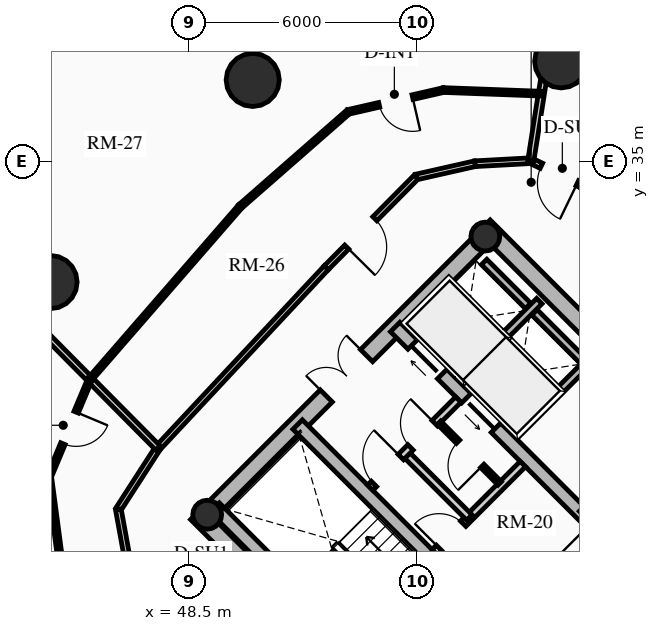
"""IFC4 building model, lengths in metres.
Left out: names, types, materials, properties, quantities, classifications, styles, units other than length and angle.
Written with IfcOpenShell. Run it as: python <this file> out.ifc"""

import sys

from ifc_helpers import new_model, si_unit, direction, frame, frame_2d, origin, origin_2d, place, context, subcontext, project, spatial, rectangle, circle, hollow_circle, extrude, source, transform, mapped, element, fill, save


model = new_model("IFC4")
c1 = context("Model", 3, precision=1e-05, world=origin(), true_north=direction((0.0, 1.0)))
c2 = subcontext(c1, "Body", "Model", "MODEL_VIEW")
j1 = project(units=[si_unit("LENGTHUNIT", "METRE"), si_unit("PLANEANGLEUNIT", "RADIAN")], contexts=[c1])
p1 = place(None, origin())
s1 = spatial("IfcSite", under=j1, at=p1, CompositionType="ELEMENT")
p2 = place(p1, origin())
s2 = spatial("IfcBuilding", under=s1, at=p2, CompositionType="ELEMENT")
p3 = place(p2, frame((0.0, 0.0, 87.61)))
s3 = spatial("IfcBuildingStorey", under=s2, at=p3, CompositionType="ELEMENT", Elevation=87.61)
for number, where, z_axis, x_axis in (
    (1, (58.737, 15.697, 0.0), (0.0, 0.0, 1.0), (-0.707, 0.707, 0.0)),
    (2, (66.303, 23.263, 0.0), (0.0, 0.0, 1.0), (-0.707, 0.707, 0.0)),
):
    element("IfcWall", number, at=place(p3, frame(where, z_axis=z_axis, x_axis=x_axis)), inside=s3, PredefinedType="SHEAR", context=c2, shape_type="SweptSolid", body=[
        extrude(rectangle(XDim=14.2, YDim=0.45, at=frame_2d((7.1, 0.0))), origin(), (0.0, 0.0, 1.0), 2.91),
    ])
p4 = place(p3, frame((48.856, 25.578, 0.0), z_axis=(0.0, 0.0, 1.0), x_axis=(0.707106781187, 0.707106781187, 0.0)))
e3 = element("IfcWall", 3, at=p4, inside=s3, PredefinedType="SHEAR", context=c2, shape_type="SweptSolid", body=[
    extrude(rectangle(XDim=10.7, YDim=0.45, at=frame_2d((5.35, 0.0))), origin(), (0.0, 0.0, 1.0), 2.91),
])
m1 = source(origin(), c2, "Body", "SweptSolid", [
    extrude(rectangle(XDim=1.5, YDim=2.02, at=frame_2d((0.75, 1.01))), frame((0.0, 0.235, 0.0), z_axis=(0.0, -1.0, 0.0), x_axis=(1.0, 0.0, 0.0)), (0.0, 0.0, 1.0), 0.47),
])
p5 = place(p4, frame((4.6, 0.0, 0.0)))
e4 = element("IfcOpeningElement", 4, at=p5, cuts=e3, PredefinedType="OPENING", context=c2, shape_type="MappedRepresentation", body=[
    mapped(m1, transform((0.0, 0.0, 0.0), x_axis=(1.0, 0.0, 0.0), y_axis=(0.0, 1.0, 0.0), z_axis=(0.0, 0.0, 1.0), scale=1.0)),
])
p6 = place(p3, frame((61.078, 18.355, 0.0), z_axis=(0.0, 0.0, 1.0), x_axis=(-0.707106781187, 0.707106781187, 0.0)))
e5 = element("IfcWall", 5, at=p6, inside=s3, PredefinedType="SHEAR", context=c2, shape_type="SweptSolid", body=[
    extrude(rectangle(XDim=13.75, YDim=0.35, at=frame_2d((6.875, 0.0))), origin(), (0.0, 0.0, 1.0), 2.91),
])
m2 = source(origin(), c2, "Body", "SweptSolid", [
    extrude(rectangle(XDim=1.1, YDim=2.015, at=frame_2d((0.55, 1.007))), frame((0.0, 0.185, 0.0), z_axis=(0.0, -1.0, 0.0), x_axis=(1.0, 0.0, 0.0)), (0.0, 0.0, 1.0), 0.37),
])
p7 = place(p6, frame((4.875, 0.0, 0.0)))
e6 = element("IfcOpeningElement", 6, at=p7, cuts=e5, PredefinedType="OPENING", context=c2, shape_type="MappedRepresentation", body=[
    mapped(m2, transform((0.0, 0.0, 0.0), x_axis=(1.0, 0.0, 0.0), y_axis=(0.0, 1.0, 0.0), z_axis=(0.0, 0.0, 1.0), scale=1.0)),
])
m3 = source(origin(), c2, "Body", "SweptSolid", [
    extrude(rectangle(XDim=1.15, YDim=2.02, at=frame_2d((0.575, 1.01))), frame((0.0, 0.185, 0.0), z_axis=(0.0, -1.0, 0.0), x_axis=(1.0, 0.0, 0.0)), (0.0, 0.0, 1.0), 0.37),
])
p8 = place(p6, frame((7.295, 0.0, 0.0)))
e7 = element("IfcOpeningElement", 7, at=p8, cuts=e5, PredefinedType="OPENING", context=c2, shape_type="MappedRepresentation", body=[
    mapped(m3, transform((0.0, 0.0, 0.0), x_axis=(1.0, 0.0, 0.0), y_axis=(0.0, 1.0, 0.0), z_axis=(0.0, 0.0, 1.0), scale=1.0)),
])
p9 = place(p3, frame((63.645, 20.922, 0.0), z_axis=(0.0, 0.0, 1.0), x_axis=(-0.707106781187, 0.707106781187, 0.0)))
e8 = element("IfcWall", 8, at=p9, inside=s3, PredefinedType="SHEAR", context=c2, shape_type="SweptSolid", body=[
    extrude(rectangle(XDim=13.75, YDim=0.35, at=frame_2d((6.875, 0.0))), origin(), (0.0, 0.0, 1.0), 2.91),
])
p10 = place(p9, frame((10.0, 0.0, 0.0)))
e9 = element("IfcOpeningElement", 9, at=p10, cuts=e8, PredefinedType="OPENING", context=c2, shape_type="MappedRepresentation", body=[
    mapped(m2, transform((0.0, 0.0, 0.0), x_axis=(1.0, 0.0, 0.0), y_axis=(0.0, 1.0, 0.0), z_axis=(0.0, 0.0, 1.0), scale=1.0)),
])
p11 = place(p9, frame((12.0, 0.0, 0.0)))
e10 = element("IfcOpeningElement", 10, at=p11, cuts=e8, PredefinedType="OPENING", context=c2, shape_type="MappedRepresentation", body=[
    mapped(m2, transform((0.0, 0.0, 0.0), x_axis=(1.0, 0.0, 0.0), y_axis=(0.0, 1.0, 0.0), z_axis=(0.0, 0.0, 1.0), scale=1.0)),
])
p12 = place(p9, frame((5.305, 0.0, 0.0)))
e11 = element("IfcOpeningElement", 11, at=p12, cuts=e8, PredefinedType="OPENING", context=c2, shape_type="MappedRepresentation", body=[
    mapped(m3, transform((0.0, 0.0, 0.0), x_axis=(1.0, 0.0, 0.0), y_axis=(0.0, 1.0, 0.0), z_axis=(0.0, 0.0, 1.0), scale=1.0)),
])
p13 = place(p3, frame((53.922, 21.141, 0.0), z_axis=(0.0, 0.0, 1.0), x_axis=(-0.707088616009, 0.707124945897, 0.0)))
e12 = element("IfcWall", 12, at=p13, inside=s3, PredefinedType="SHEAR", context=c2, shape_type="SweptSolid", body=[
    extrude(rectangle(XDim=6.72, YDim=0.35, at=frame_2d((3.36, 0.0))), origin(), (0.0, 0.0, 1.0), 2.91),
])
for number, where, z_axis, x_axis in (
    (13, (48.976, 25.706, 0.0), (0.0, 0.0, 1.0), (0.707, 0.707, 0.0)),
    (14, (56.294, 33.024, 0.0), (0.0, 0.0, 1.0), (0.707, 0.707, 0.0)),
):
    element("IfcColumn", number, at=place(p3, frame(where, z_axis=z_axis, x_axis=x_axis)), inside=s3, PredefinedType="COLUMN", context=c2, shape_type="SweptSolid", body=[
        extrude(hollow_circle(Radius=0.38, WallThickness=0.032, at=origin_2d()), origin(), (0.0, 0.0, 1.0), 2.91),
    ])
for number, where, z_axis, x_axis in (
    (15, (58.291, 37.635, 0.0), (0.0, 0.0, 1.0), (1.0, 0.0, 0.0)),
    (16, (50.173, 37.146, 0.0), (0.0, 0.0, 1.0), (1.0, 0.0, 0.0)),
    (17, (44.854, 31.827, 0.0), (0.0, 0.0, 1.0), (1.0, 0.0, 0.0)),
):
    element("IfcColumn", number, at=place(p3, frame(where, z_axis=z_axis, x_axis=x_axis)), inside=s3, PredefinedType="USERDEFINED", context=c2, shape_type="SweptSolid", body=[
        extrude(circle(Radius=0.7, at=origin_2d()), origin(), (0.0, 0.0, 1.0), 2.91),
    ])
p14 = place(p3, frame((57.062, 27.781, 0.0), z_axis=(0.0, 0.0, 1.0), x_axis=(0.707106781187, 0.707106781187, 0.0)))
e18 = element("IfcWall", 18, at=p14, inside=s3, PredefinedType="SHEAR", context=c2, shape_type="SweptSolid", body=[
    extrude(rectangle(XDim=2.97, YDim=0.2, at=frame_2d((1.485, 0.0))), origin(), (0.0, 0.0, 1.0), 2.91),
])
p15 = place(p3, frame((55.615, 29.227, 0.0), z_axis=(0.0, 0.0, 1.0), x_axis=(0.707147878904, 0.70706568108, 0.0)))
e19 = element("IfcWall", 19, at=p15, inside=s3, PredefinedType="SHEAR", context=c2, shape_type="SweptSolid", body=[
    extrude(rectangle(XDim=2.97, YDim=0.2, at=frame_2d((1.485, 0.0))), origin(), (0.0, 0.0, 1.0), 2.91),
])
p16 = place(p3, frame((58.865, 29.754, 0.0), z_axis=(0.0, 0.0, 1.0), x_axis=(-0.707174411312, 0.707039144592, 0.0)))
e20 = element("IfcWall", 20, at=p16, inside=s3, PredefinedType="SHEAR", context=c2, shape_type="SweptSolid", body=[
    extrude(rectangle(XDim=1.805, YDim=0.2, at=frame_2d((0.902, 0.0))), origin(), (0.0, 0.0, 1.0), 2.91),
])
p17 = place(p3, frame((57.419, 31.2, 0.0), z_axis=(0.0, 0.0, 1.0), x_axis=(-0.707032117043, 0.707181437447, 0.0)))
e21 = element("IfcWall", 21, at=p17, inside=s3, PredefinedType="SHEAR", context=c2, shape_type="SweptSolid", body=[
    extrude(rectangle(XDim=1.635, YDim=0.2, at=frame_2d((0.817, 0.0))), origin(), (0.0, 0.0, 1.0), 2.91),
])
p18 = place(p3, frame((54.961, 24.719, 0.0), z_axis=(0.0, 0.0, 1.0), x_axis=(0.707106781187, 0.707106781187, 0.0)))
e22 = element("IfcWall", 22, at=p18, inside=s3, PredefinedType="PARTITIONING", context=c2, shape_type="SweptSolid", body=[
    extrude(rectangle(XDim=3.28, YDim=0.2, at=frame_2d((1.64, 0.0))), origin(), (0.0, 0.0, 1.0), 2.655),
])
m4 = source(origin(), c2, "Body", "SweptSolid", [
    extrude(rectangle(XDim=0.9, YDim=2.005, at=frame_2d((0.45, 1.002))), frame((0.0, 0.11, 0.0), z_axis=(0.0, -1.0, 0.0), x_axis=(1.0, 0.0, 0.0)), (0.0, 0.0, 1.0), 0.22),
])
p19 = place(p18, frame((0.16, 0.0, 0.0)))
e23 = element("IfcOpeningElement", 23, at=p19, cuts=e22, PredefinedType="OPENING", context=c2, shape_type="MappedRepresentation", body=[
    mapped(m4, transform((0.0, 0.0, 0.0), x_axis=(1.0, 0.0, 0.0), y_axis=(0.0, 1.0, 0.0), z_axis=(0.0, 0.0, 1.0), scale=1.0)),
])
p20 = place(p3, frame((55.874, 25.631, 0.0), z_axis=(0.0, 0.0, 1.0), x_axis=(-0.707157639372, 0.707055919343, 0.0)))
e24 = element("IfcWall", 24, at=p20, inside=s3, PredefinedType="PARTITIONING", context=c2, shape_type="SweptSolid", body=[
    extrude(rectangle(XDim=2.4, YDim=0.2, at=frame_2d((1.2, 0.0))), origin(), (0.0, 0.0, 1.0), 2.655),
])
p21 = place(p3, frame((53.264, 26.416, 0.0), z_axis=(0.0, 0.0, 1.0), x_axis=(0.707106781187, 0.707106781187, 0.0)))
e25 = element("IfcWall", 25, at=p21, inside=s3, PredefinedType="PARTITIONING", context=c2, shape_type="SweptSolid", body=[
    extrude(rectangle(XDim=3.28, YDim=0.2, at=frame_2d((1.64, 0.0))), origin(), (0.0, 0.0, 1.0), 2.655),
])
m5 = source(origin(), c2, "Body", "SweptSolid", [
    extrude(rectangle(XDim=1.0, YDim=2.015, at=frame_2d((0.5, 1.007))), frame((0.0, 0.11, 0.0), z_axis=(0.0, -1.0, 0.0), x_axis=(1.0, 0.0, 0.0)), (0.0, 0.0, 1.0), 0.22),
])
p22 = place(p21, frame((0.14, 0.0, 0.0)))
e26 = element("IfcOpeningElement", 26, at=p22, cuts=e25, PredefinedType="OPENING", context=c2, shape_type="MappedRepresentation", body=[
    mapped(m5, transform((0.0, 0.0, 0.0), x_axis=(1.0, 0.0, 0.0), y_axis=(0.0, 1.0, 0.0), z_axis=(0.0, 0.0, 1.0), scale=1.0)),
])
p23 = place(p21, frame((1.5, 0.0, 0.0)))
e27 = element("IfcOpeningElement", 27, at=p23, cuts=e25, PredefinedType="OPENING", context=c2, shape_type="MappedRepresentation", body=[
    mapped(m4, transform((0.0, 0.0, 0.0), x_axis=(1.0, 0.0, 0.0), y_axis=(0.0, 1.0, 0.0), z_axis=(0.0, 0.0, 1.0), scale=1.0)),
])
p24 = place(p3, frame((56.673, 26.529, 0.0), z_axis=(0.0, 0.0, 1.0), x_axis=(-0.707052764397, 0.70716079385, 0.0)))
e28 = element("IfcWall", 28, at=p24, inside=s3, PredefinedType="PARTITIONING", context=c2, shape_type="SweptSolid", body=[
    extrude(rectangle(XDim=2.26, YDim=0.125, at=frame_2d((1.13, 0.0))), origin(), (0.0, 0.0, 1.0), 2.655),
])
m6 = source(origin(), c2, "Body", "SweptSolid", [
    extrude(rectangle(XDim=0.9, YDim=2.005, at=frame_2d((0.45, 1.002))), frame((0.0, 0.073, 0.0), z_axis=(0.0, -1.0, 0.0), x_axis=(1.0, 0.0, 0.0)), (0.0, 0.0, 1.0), 0.145),
])
p25 = place(p24, frame((0.65, 0.0, 0.0)))
e29 = element("IfcOpeningElement", 29, at=p25, cuts=e28, PredefinedType="OPENING", context=c2, shape_type="MappedRepresentation", body=[
    mapped(m6, transform((0.0, 0.0, 0.0), x_axis=(1.0, 0.0, 0.0), y_axis=(0.0, 1.0, 0.0), z_axis=(0.0, 0.0, 1.0), scale=1.0)),
])
p26 = place(p3, frame((58.823, 34.378, 0.0), z_axis=(0.0, 0.0, 1.0), x_axis=(-0.900449137666, 0.434961320668, 0.0)))
e30 = element("IfcWall", 30, at=p26, inside=s3, PredefinedType="PARTITIONING", context=c2, shape_type="SweptSolid", body=[
    extrude(rectangle(XDim=1.479, YDim=0.15, at=frame_2d((0.74, 0.0))), origin(), (0.0, 0.0, 1.0), 2.225),
])
m7 = source(origin(), c2, "Body", "SweptSolid", [
    extrude(rectangle(XDim=1.05, YDim=2.015, at=frame_2d((0.525, 1.007))), frame((0.0, 0.085, 0.0), z_axis=(0.0, -1.0, 0.0), x_axis=(1.0, 0.0, 0.0)), (0.0, 0.0, 1.0), 0.17),
])
p27 = place(p26, frame((0.12, 0.0, 0.0)))
e31 = element("IfcOpeningElement", 31, at=p27, cuts=e30, PredefinedType="OPENING", context=c2, shape_type="MappedRepresentation", body=[
    mapped(m7, transform((0.0, 0.0, 0.0), x_axis=(1.0, 0.0, 0.0), y_axis=(0.0, 1.0, 0.0), z_axis=(0.0, 0.0, 1.0), scale=1.0)),
])
p28 = place(p3, frame((57.491, 35.021, 0.0), z_axis=(0.0, 0.0, 1.0), x_axis=(-0.9985194771, -0.054395347698, 0.0)))
e32 = element("IfcWall", 32, at=p28, inside=s3, PredefinedType="PARTITIONING", context=c2, shape_type="SweptSolid", body=[
    extrude(rectangle(XDim=1.472, YDim=0.15, at=frame_2d((0.736, 0.0))), origin(), (0.0, 0.0, 1.0), 2.225),
])
p29 = place(p3, frame((56.021, 34.941, 0.0), z_axis=(0.0, 0.0, 1.0), x_axis=(-0.975309543901, -0.220842236847, 0.0)))
e33 = element("IfcWall", 33, at=p29, inside=s3, PredefinedType="PARTITIONING", context=c2, shape_type="SweptSolid", body=[
    extrude(rectangle(XDim=1.585, YDim=0.15, at=frame_2d((0.792, 0.0))), origin(), (0.0, 0.0, 1.0), 2.225),
])
p30 = place(p3, frame((54.475, 34.591, 0.0), z_axis=(0.0, 0.0, 1.0), x_axis=(-0.703869646439, -0.710329163714, 0.0)))
e34 = element("IfcWall", 34, at=p30, inside=s3, PredefinedType="PARTITIONING", context=c2, shape_type="SweptSolid", body=[
    extrude(rectangle(XDim=3.364, YDim=0.15, at=frame_2d((1.682, 0.0))), origin(), (0.0, 0.0, 1.0), 2.225),
])
p31 = place(p30, frame((1.546, 0.0, 0.0)))
e35 = element("IfcOpeningElement", 35, at=p31, cuts=e34, PredefinedType="OPENING", context=c2, shape_type="MappedRepresentation", body=[
    mapped(m7, transform((0.0, 0.0, 0.0), x_axis=(1.0, 0.0, 0.0), y_axis=(0.0, 1.0, 0.0), z_axis=(0.0, 0.0, 1.0), scale=1.0)),
])
p32 = place(p3, frame((52.107, 32.202, 0.0), z_axis=(0.0, 0.0, 1.0), x_axis=(-0.682605209028, -0.730787334734, 0.0)))
e36 = element("IfcWall", 36, at=p32, inside=s3, PredefinedType="PARTITIONING", context=c2, shape_type="SweptSolid", body=[
    extrude(rectangle(XDim=6.486, YDim=0.15, at=frame_2d((3.243, 0.0))), origin(), (0.0, 0.0, 1.0), 2.225),
])
p33 = place(p3, frame((47.68, 27.462, 0.0), z_axis=(0.0, 0.0, 1.0), x_axis=(-0.542097952486, -0.840315303865, 0.0)))
e37 = element("IfcWall", 37, at=p33, inside=s3, PredefinedType="PARTITIONING", context=c2, shape_type="SweptSolid", body=[
    extrude(rectangle(XDim=1.923, YDim=0.15, at=frame_2d((0.961, 0.0))), origin(), (0.0, 0.0, 1.0), 2.225),
])
p34 = place(p3, frame((46.637, 25.846, 0.0), z_axis=(0.0, 0.0, 1.0), x_axis=(0.179617307107, -0.983736561782, 0.0)))
e38 = element("IfcWall", 38, at=p34, inside=s3, PredefinedType="PARTITIONING", context=c2, shape_type="SweptSolid", body=[
    extrude(rectangle(XDim=1.38, YDim=0.15, at=frame_2d((0.69, 0.0))), origin(), (0.0, 0.0, 1.0), 2.225),
])
p35 = place(p3, frame((57.491, 35.021, 0.0), z_axis=(0.0, 0.0, 1.0), x_axis=(0.155805268746, 0.98778779008, 0.0)))
e39 = element("IfcWall", 39, at=p35, inside=s3, PredefinedType="PARTITIONING", context=c2, shape_type="SweptSolid", body=[
    extrude(rectangle(XDim=6.376, YDim=0.16, at=frame_2d((3.188, 0.0))), origin(), (0.0, 0.0, 1.0), 2.179),
])
p36 = place(p3, frame((47.68, 27.462, 0.0), z_axis=(0.0, 0.0, 1.0), x_axis=(-0.703913074907, 0.710286127539, 0.0)))
e40 = element("IfcWall", 40, at=p36, inside=s3, PredefinedType="PARTITIONING", context=c2, shape_type="SweptSolid", body=[
    extrude(rectangle(XDim=9.079, YDim=0.16, at=frame_2d((4.54, 0.0))), origin(), (0.0, 0.0, 1.0), 2.179),
])
p37 = place(p3, frame((57.769, 36.785, 0.0), z_axis=(0.0, 0.0, 1.0), x_axis=(-0.999316779648, 0.036959084311, 0.0)))
e41 = element("IfcWall", 41, at=p37, inside=s3, PredefinedType="PARTITIONING", context=c2, shape_type="SweptSolid", body=[
    extrude(rectangle(XDim=2.576, YDim=0.125, at=frame_2d((1.288, 0.0))), origin(), (0.0, 0.0, 1.0), 2.655),
])
p38 = place(p3, frame((55.194, 36.88, 0.0), z_axis=(0.0, 0.0, 1.0), x_axis=(-0.97469098149, -0.22355645954, 0.0)))
e42 = element("IfcWall", 42, at=p38, inside=s3, PredefinedType="PARTITIONING", context=c2, shape_type="SweptSolid", body=[
    extrude(rectangle(XDim=2.573, YDim=0.125, at=frame_2d((1.287, 0.0))), origin(), (0.0, 0.0, 1.0), 2.225),
])
p39 = place(p38, frame((0.836, 0.0, 0.0)))
e43 = element("IfcOpeningElement", 43, at=p39, cuts=e42, PredefinedType="OPENING", context=c2, shape_type="MappedRepresentation", body=[
    mapped(m6, transform((0.0, 0.0, 0.0), x_axis=(1.0, 0.0, 0.0), y_axis=(0.0, 1.0, 0.0), z_axis=(0.0, 0.0, 1.0), scale=1.0)),
])
p40 = place(p3, frame((52.687, 36.305, 0.0), z_axis=(0.0, 0.0, 1.0), x_axis=(-0.752332345919, -0.658783759123, 0.0)))
e44 = element("IfcWall", 44, at=p40, inside=s3, PredefinedType="PARTITIONING", context=c2, shape_type="SweptSolid", body=[
    extrude(rectangle(XDim=3.776, YDim=0.125, at=frame_2d((1.888, 0.0))), origin(), (0.0, 0.0, 1.0), 2.225),
])
p41 = place(p3, frame((49.845, 33.817, 0.0), z_axis=(0.0, 0.0, 1.0), x_axis=(-0.656101508867, -0.754672650931, 0.0)))
e45 = element("IfcWall", 45, at=p41, inside=s3, PredefinedType="PARTITIONING", context=c2, shape_type="SweptSolid", body=[
    extrude(rectangle(XDim=6.029, YDim=0.125, at=frame_2d((3.014, 0.0))), origin(), (0.0, 0.0, 1.0), 2.225),
])
p42 = place(p3, frame((45.89, 29.268, 0.0), z_axis=(0.0, 0.0, 1.0), x_axis=(-0.387057419757, -0.922055613188, 0.0)))
e46 = element("IfcWall", 46, at=p42, inside=s3, PredefinedType="PARTITIONING", context=c2, shape_type="SweptSolid", body=[
    extrude(rectangle(XDim=2.774, YDim=0.125, at=frame_2d((1.387, 0.0))), origin(), (0.0, 0.0, 1.0), 2.225),
])
p43 = place(p42, frame((0.937, 0.0, 0.0)))
e47 = element("IfcOpeningElement", 47, at=p43, cuts=e46, PredefinedType="OPENING", context=c2, shape_type="MappedRepresentation", body=[
    mapped(m6, transform((0.0, 0.0, 0.0), x_axis=(1.0, 0.0, 0.0), y_axis=(0.0, 1.0, 0.0), z_axis=(0.0, 0.0, 1.0), scale=1.0)),
])
p44 = place(p3, frame((44.816, 26.71, 0.0), z_axis=(0.0, 0.0, 1.0), x_axis=(0.131724981355, -0.991286300363, 0.0)))
e48 = element("IfcWall", 48, at=p44, inside=s3, PredefinedType="PARTITIONING", context=c2, shape_type="SweptSolid", body=[
    extrude(rectangle(XDim=2.515, YDim=0.125, at=frame_2d((1.258, 0.0))), origin(), (0.0, 0.0, 1.0), 2.655),
])
m8 = source(origin(), c2, "Body", "SweptSolid", [
    extrude(rectangle(XDim=1.1, YDim=2.015, at=frame_2d((0.55, 1.007))), frame((0.0, 0.025, 0.0), z_axis=(0.0, -1.0, 0.0), x_axis=(1.0, 0.0, 0.0)), (0.0, 0.0, 1.0), 0.05),
])
p45 = place(p10, origin())
e49 = element("IfcDoor", 49, at=p45, inside=s3, OperationType="SLIDING_TO_LEFT", PredefinedType="DOOR", context=c2, shape_type="MappedRepresentation", body=[
    mapped(m8, transform((0.0, 0.0, 0.0), x_axis=(1.0, 0.0, 0.0), y_axis=(0.0, 1.0, 0.0), z_axis=(0.0, 0.0, 1.0), scale=1.0)),
])
fill(e9, e49)
p46 = place(p11, origin())
e50 = element("IfcDoor", 50, at=p46, inside=s3, OperationType="SLIDING_TO_RIGHT", PredefinedType="DOOR", context=c2, shape_type="MappedRepresentation", body=[
    mapped(m8, transform((0.0, 0.0, 0.0), x_axis=(1.0, 0.0, 0.0), y_axis=(0.0, 1.0, 0.0), z_axis=(0.0, 0.0, 1.0), scale=1.0)),
])
fill(e10, e50)
m9 = source(origin(), c2, "Body", "SweptSolid", [
    extrude(rectangle(XDim=1.5, YDim=2.02, at=frame_2d((0.75, 1.01))), frame((0.0, 0.025, 0.0), z_axis=(0.0, -1.0, 0.0), x_axis=(1.0, 0.0, 0.0)), (0.0, 0.0, 1.0), 0.05),
])
p47 = place(p5, origin())
e51 = element("IfcDoor", 51, at=p47, inside=s3, OperationType="DOUBLE_DOOR_SINGLE_SWING", PredefinedType="DOOR", context=c2, shape_type="MappedRepresentation", body=[
    mapped(m9, transform((0.0, 0.0, 0.0), x_axis=(1.0, 0.0, 0.0), y_axis=(0.0, 1.0, 0.0), z_axis=(0.0, 0.0, 1.0), scale=1.0)),
])
fill(e4, e51)
m10 = source(origin(), c2, "Body", "SweptSolid", [
    extrude(rectangle(XDim=0.9, YDim=2.005, at=frame_2d((0.45, 1.002))), frame((0.0, 0.025, 0.0), z_axis=(0.0, -1.0, 0.0), x_axis=(1.0, 0.0, 0.0)), (0.0, 0.0, 1.0), 0.05),
])
p48 = place(p19, origin())
e52 = element("IfcDoor", 52, at=p48, inside=s3, OperationType="SINGLE_SWING_LEFT", PredefinedType="DOOR", context=c2, shape_type="MappedRepresentation", body=[
    mapped(m10, transform((0.0, 0.0, 0.0), x_axis=(1.0, 0.0, 0.0), y_axis=(0.0, 1.0, 0.0), z_axis=(0.0, 0.0, 1.0), scale=1.0)),
])
fill(e23, e52)
m11 = source(origin(), c2, "Body", "SweptSolid", [
    extrude(rectangle(XDim=1.0, YDim=2.015, at=frame_2d((0.5, 1.007))), frame((0.0, 0.025, 0.0), z_axis=(0.0, -1.0, 0.0), x_axis=(1.0, 0.0, 0.0)), (0.0, 0.0, 1.0), 0.05),
])
p49 = place(p22, origin())
e53 = element("IfcDoor", 53, at=p49, inside=s3, OperationType="SINGLE_SWING_RIGHT", PredefinedType="DOOR", context=c2, shape_type="MappedRepresentation", body=[
    mapped(m11, transform((0.0, 0.0, 0.0), x_axis=(1.0, 0.0, 0.0), y_axis=(0.0, 1.0, 0.0), z_axis=(0.0, 0.0, 1.0), scale=1.0)),
])
fill(e26, e53)
p50 = place(p23, origin())
e54 = element("IfcDoor", 54, at=p50, inside=s3, OperationType="SINGLE_SWING_RIGHT", PredefinedType="DOOR", context=c2, shape_type="MappedRepresentation", body=[
    mapped(m10, transform((0.0, 0.0, 0.0), x_axis=(1.0, 0.0, 0.0), y_axis=(0.0, 1.0, 0.0), z_axis=(0.0, 0.0, 1.0), scale=1.0)),
])
fill(e27, e54)
p51 = place(p25, origin())
e55 = element("IfcDoor", 55, at=p51, inside=s3, OperationType="SINGLE_SWING_LEFT", PredefinedType="DOOR", context=c2, shape_type="MappedRepresentation", body=[
    mapped(m10, transform((0.0, 0.0, 0.0), x_axis=(1.0, 0.0, 0.0), y_axis=(0.0, 1.0, 0.0), z_axis=(0.0, 0.0, 1.0), scale=1.0)),
])
fill(e29, e55)
m12 = source(origin(), c2, "Body", "SweptSolid", [
    extrude(rectangle(XDim=1.05, YDim=2.015, at=frame_2d((0.525, 1.007))), frame((0.0, 0.025, 0.0), z_axis=(0.0, -1.0, 0.0), x_axis=(1.0, 0.0, 0.0)), (0.0, 0.0, 1.0), 0.05),
])
p52 = place(p31, origin())
e56 = element("IfcDoor", 56, at=p52, inside=s3, OperationType="SINGLE_SWING_RIGHT", PredefinedType="DOOR", context=c2, shape_type="MappedRepresentation", body=[
    mapped(m12, transform((0.0, 0.0, 0.0), x_axis=(1.0, 0.0, 0.0), y_axis=(0.0, 1.0, 0.0), z_axis=(0.0, 0.0, 1.0), scale=1.0)),
])
fill(e35, e56)
p53 = place(p39, origin())
e57 = element("IfcDoor", 57, at=p53, inside=s3, OperationType="SINGLE_SWING_LEFT", PredefinedType="DOOR", context=c2, shape_type="MappedRepresentation", body=[
    mapped(m10, transform((0.0, 0.0, 0.0), x_axis=(1.0, 0.0, 0.0), y_axis=(0.0, 1.0, 0.0), z_axis=(0.0, 0.0, 1.0), scale=1.0)),
])
fill(e43, e57)
p54 = place(p43, origin())
e58 = element("IfcDoor", 58, at=p54, inside=s3, OperationType="SINGLE_SWING_LEFT", PredefinedType="DOOR", context=c2, shape_type="MappedRepresentation", body=[
    mapped(m10, transform((0.0, 0.0, 0.0), x_axis=(1.0, 0.0, 0.0), y_axis=(0.0, 1.0, 0.0), z_axis=(0.0, 0.0, 1.0), scale=1.0)),
])
fill(e47, e58)
p55 = place(p27, origin())
e59 = element("IfcDoor", 59, at=p55, inside=s3, OperationType="SINGLE_SWING_LEFT", PredefinedType="DOOR", context=c2, shape_type="MappedRepresentation", body=[
    mapped(m12, transform((0.0, 0.0, 0.0), x_axis=(1.0, 0.0, 0.0), y_axis=(0.0, 1.0, 0.0), z_axis=(0.0, 0.0, 1.0), scale=1.0)),
])
fill(e31, e59)
save(model, sys.argv[1])
